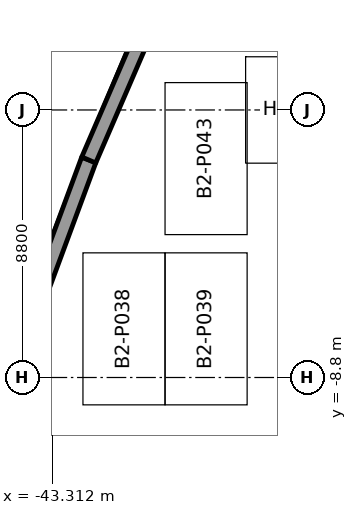
"""IFC4 building model, lengths in metres.
Left out: names, types, materials, properties, quantities, classifications, styles, units other than length and angle.
Written with IfcOpenShell. Run it as: python <this file> out.ifc"""

import sys

from ifc_helpers import new_model, si_unit, direction, frame, frame_2d, origin, place, context, subcontext, project, spatial, rectangle, extrude, element, save


model = new_model("IFC4")
c1 = context("Model", 3, precision=1e-05, world=origin(), true_north=direction((0.0, 1.0)))
c2 = subcontext(c1, "Body", "Model", "MODEL_VIEW")
j1 = project(units=[si_unit("LENGTHUNIT", "METRE"), si_unit("PLANEANGLEUNIT", "RADIAN")], contexts=[c1])
p1 = place(None, origin())
s1 = spatial("IfcSite", under=j1, at=p1, CompositionType="ELEMENT")
p2 = place(p1, origin())
s2 = spatial("IfcBuilding", under=s1, at=p2, CompositionType="ELEMENT")
p3 = place(p2, frame((0.0, 0.0, -9.0)))
s3 = spatial("IfcBuildingStorey", under=s2, at=p3, CompositionType="ELEMENT", Elevation=-9.0)
p4 = place(p3, frame((-45.012, -9.482, 0.0), z_axis=(0.0, 0.0, 1.0), x_axis=(0.347237291218, 0.937777299569, 0.0)))
e1 = element("IfcWall", 1, at=p4, inside=s3, PredefinedType="SOLIDWALL", context=c2, shape_type="SweptSolid", body=[
    extrude(rectangle(XDim=8.358, YDim=0.5, at=frame_2d((4.179, 0.0))), origin(), (0.0, 0.0, 1.0), 4.5),
])
p5 = place(p3, frame((-42.11, -1.644, 0.0), z_axis=(0.0, 0.0, 1.0), x_axis=(0.396582550064, 0.917999063717, 0.0)))
e2 = element("IfcWall", 2, at=p5, inside=s3, PredefinedType="SOLIDWALL", context=c2, shape_type="SweptSolid", body=[
    extrude(rectangle(XDim=8.425, YDim=0.5, at=frame_2d((4.213, 0.0))), origin(), (0.0, 0.0, 1.0), 4.5),
])
save(model, sys.argv[1])
